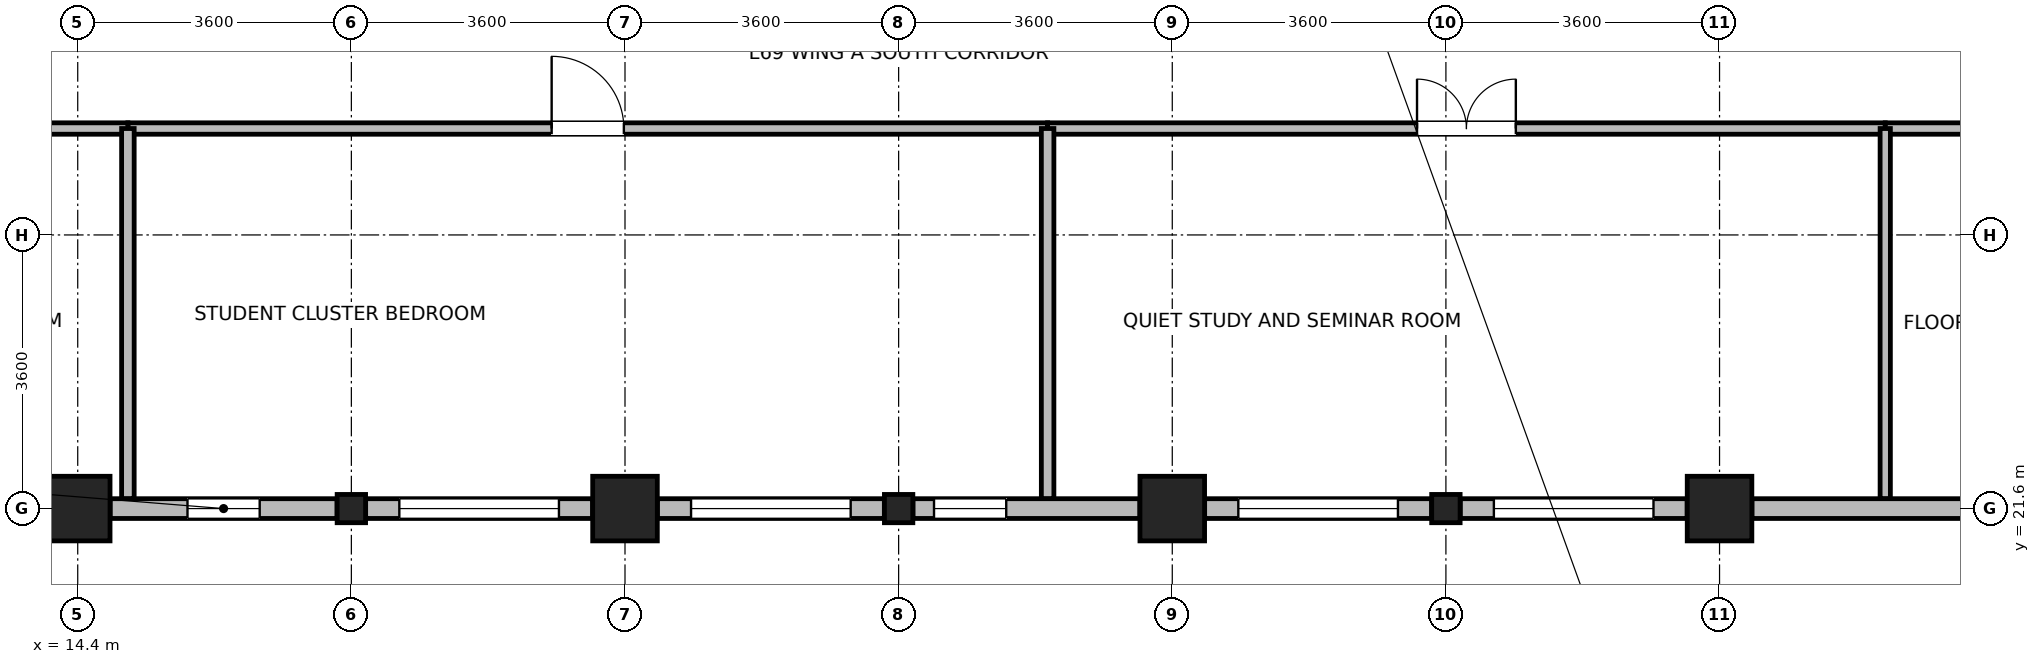
"""IFC4 building model, lengths in metres.
Left out: names, types, materials, properties, quantities, classifications, styles, units other than length and angle.
Written with IfcOpenShell. Run it as: python <this file> out.ifc"""

import sys

from ifc_helpers import new_model, si_unit, direction, frame, frame_2d, origin, origin_2d, place, context, subcontext, project, spatial, rectangle, i_section, extrude, source, transform, mapped, element, fill, save


model = new_model("IFC4")
c1 = context("Model", 3, precision=1e-05, world=origin(), true_north=direction((0.0, 1.0)))
c2 = subcontext(c1, "Body", "Model", "MODEL_VIEW")
j1 = project(units=[si_unit("LENGTHUNIT", "METRE"), si_unit("PLANEANGLEUNIT", "RADIAN")], contexts=[c1])
p1 = place(None, origin())
s1 = spatial("IfcSite", under=j1, at=p1, CompositionType="ELEMENT")
p2 = place(p1, origin())
s2 = spatial("IfcBuilding", under=s1, at=p2, CompositionType="ELEMENT")
p3 = place(p2, frame((0.0, 0.0, 268.4)))
s3 = spatial("IfcBuildingStorey", under=s2, at=p3, CompositionType="ELEMENT", Elevation=268.4)
m1 = source(origin(), c2, "Body", "SweptSolid", [
    extrude(rectangle(XDim=0.85, YDim=0.85, at=origin_2d()), origin(), (0.0, 0.0, 1.0), 3.7),
])
for number, where, z_axis, x_axis in (
    (1, (14.4, 21.6, 0.0), (0.0, 0.0, 1.0), (1.0, 0.0, 0.0)),
    (2, (21.6, 21.6, 0.0), (0.0, 0.0, 1.0), (1.0, 0.0, 0.0)),
    (3, (28.8, 21.6, 0.0), (0.0, 0.0, 1.0), (1.0, 0.0, 0.0)),
    (4, (36.0, 21.6, 0.0), (0.0, 0.0, 1.0), (1.0, 0.0, 0.0)),
):
    element("IfcColumn", number, at=place(p3, frame(where, z_axis=z_axis, x_axis=x_axis)), inside=s3, PredefinedType="COLUMN", context=c2, shape_type="MappedRepresentation", body=[
        mapped(m1, transform((0.0, 0.0, 0.0), x_axis=(1.0, 0.0, 0.0), y_axis=(0.0, 1.0, 0.0), z_axis=(0.0, 0.0, 1.0), scale=1.0)),
    ])
m2 = source(origin(), c2, "Body", "SweptSolid", [
    extrude(i_section(OverallWidth=0.374, OverallDepth=0.372, WebThickness=0.015, FlangeThickness=0.026, FilletRadius=0.015, at=origin_2d()), origin(), (0.0, 0.0, 1.0), 3.7),
])
for number, where, z_axis, x_axis in (
    (5, (18.0, 21.6, 0.0), (0.0, 0.0, 1.0), (1.0, 0.0, 0.0)),
    (6, (25.2, 21.6, 0.0), (0.0, 0.0, 1.0), (1.0, 0.0, 0.0)),
    (7, (32.4, 21.6, 0.0), (0.0, 0.0, 1.0), (1.0, 0.0, 0.0)),
):
    element("IfcColumn", number, at=place(p3, frame(where, z_axis=z_axis, x_axis=x_axis)), inside=s3, PredefinedType="COLUMN", context=c2, shape_type="MappedRepresentation", body=[
        mapped(m2, transform((0.0, 0.0, 0.0), x_axis=(1.0, 0.0, 0.0), y_axis=(0.0, 1.0, 0.0), z_axis=(0.0, 0.0, 1.0), scale=1.0)),
    ])
p4 = place(p3, frame((17.812, 21.6, 0.0), z_axis=(0.0, 0.0, 1.0), x_axis=(-1.0, 0.0, 0.0)))
e8 = element("IfcWall", 8, at=p4, inside=s3, PredefinedType="STANDARD", context=c2, shape_type="SweptSolid", body=[
    extrude(rectangle(XDim=2.986, YDim=0.26, at=frame_2d((1.493, 0.0))), origin(), (0.0, 0.0, 1.0), 3.055),
])
p5 = place(p4, frame((1.018, 0.0, 0.85)))
e9 = element("IfcOpeningElement", 9, at=p5, cuts=e8, PredefinedType="OPENING", context=c2, shape_type="SweptSolid", body=[
    extrude(rectangle(XDim=0.95, YDim=1.75, at=frame_2d((0.475, 0.875))), frame((0.0, 0.14, 0.0), z_axis=(0.0, -1.0, 0.0), x_axis=(1.0, 0.0, 0.0)), (0.0, 0.0, 1.0), 0.28),
])
p6 = place(p3, frame((21.174, 21.6, 0.0), z_axis=(0.0, 0.0, 1.0), x_axis=(-1.0, 0.0, 0.0)))
e10 = element("IfcWall", 10, at=p6, inside=s3, PredefinedType="STANDARD", context=c2, shape_type="SweptSolid", body=[
    extrude(rectangle(XDim=2.986, YDim=0.26, at=frame_2d((1.493, 0.0))), origin(), (0.0, 0.0, 1.0), 3.055),
])
p7 = place(p6, frame((0.443, 0.0, 0.85)))
e11 = element("IfcOpeningElement", 11, at=p7, cuts=e10, PredefinedType="OPENING", context=c2, shape_type="SweptSolid", body=[
    extrude(rectangle(XDim=2.1, YDim=1.95, at=frame_2d((1.05, 0.975))), frame((0.0, 0.14, 0.0), z_axis=(0.0, -1.0, 0.0), x_axis=(1.0, 0.0, 0.0)), (0.0, 0.0, 1.0), 0.28),
])
p8 = place(p3, frame((25.012, 21.6, 0.0), z_axis=(0.0, 0.0, 1.0), x_axis=(-1.0, 0.0, 0.0)))
e12 = element("IfcWall", 12, at=p8, inside=s3, PredefinedType="STANDARD", context=c2, shape_type="SweptSolid", body=[
    extrude(rectangle(XDim=2.986, YDim=0.26, at=frame_2d((1.493, 0.0))), origin(), (0.0, 0.0, 1.0), 3.055),
])
p9 = place(p8, frame((0.443, 0.0, 0.85)))
e13 = element("IfcOpeningElement", 13, at=p9, cuts=e12, PredefinedType="OPENING", context=c2, shape_type="SweptSolid", body=[
    extrude(rectangle(XDim=2.1, YDim=1.95, at=frame_2d((1.05, 0.975))), frame((0.0, 0.14, 0.0), z_axis=(0.0, -1.0, 0.0), x_axis=(1.0, 0.0, 0.0)), (0.0, 0.0, 1.0), 0.28),
])
p10 = place(p3, frame((28.374, 21.6, 0.0), z_axis=(0.0, 0.0, 1.0), x_axis=(-1.0, 0.0, 0.0)))
e14 = element("IfcWall", 14, at=p10, inside=s3, PredefinedType="STANDARD", context=c2, shape_type="SweptSolid", body=[
    extrude(rectangle(XDim=2.986, YDim=0.26, at=frame_2d((1.493, 0.0))), origin(), (0.0, 0.0, 1.0), 3.055),
])
p11 = place(p10, frame((1.759, 0.0, 0.85)))
e15 = element("IfcOpeningElement", 15, at=p11, cuts=e14, PredefinedType="OPENING", context=c2, shape_type="SweptSolid", body=[
    extrude(rectangle(XDim=0.95, YDim=1.75, at=frame_2d((0.475, 0.875))), frame((0.0, 0.14, 0.0), z_axis=(0.0, -1.0, 0.0), x_axis=(1.0, 0.0, 0.0)), (0.0, 0.0, 1.0), 0.28),
])
p12 = place(p3, frame((32.212, 21.6, 0.0), z_axis=(0.0, 0.0, 1.0), x_axis=(-1.0, 0.0, 0.0)))
e16 = element("IfcWall", 16, at=p12, inside=s3, PredefinedType="STANDARD", context=c2, shape_type="SweptSolid", body=[
    extrude(rectangle(XDim=2.986, YDim=0.26, at=frame_2d((1.493, 0.0))), origin(), (0.0, 0.0, 1.0), 3.055),
])
p13 = place(p12, frame((0.443, 0.0, 0.85)))
e17 = element("IfcOpeningElement", 17, at=p13, cuts=e16, PredefinedType="OPENING", context=c2, shape_type="SweptSolid", body=[
    extrude(rectangle(XDim=2.1, YDim=1.95, at=frame_2d((1.05, 0.975))), frame((0.0, 0.14, 0.0), z_axis=(0.0, -1.0, 0.0), x_axis=(1.0, 0.0, 0.0)), (0.0, 0.0, 1.0), 0.28),
])
p14 = place(p3, frame((35.574, 21.6, 0.0), z_axis=(0.0, 0.0, 1.0), x_axis=(-1.0, 0.0, 0.0)))
e18 = element("IfcWall", 18, at=p14, inside=s3, PredefinedType="STANDARD", context=c2, shape_type="SweptSolid", body=[
    extrude(rectangle(XDim=2.986, YDim=0.26, at=frame_2d((1.493, 0.0))), origin(), (0.0, 0.0, 1.0), 3.055),
])
p15 = place(p14, frame((0.443, 0.0, 0.85)))
e19 = element("IfcOpeningElement", 19, at=p15, cuts=e18, PredefinedType="OPENING", context=c2, shape_type="SweptSolid", body=[
    extrude(rectangle(XDim=2.1, YDim=1.95, at=frame_2d((1.05, 0.975))), frame((0.0, 0.14, 0.0), z_axis=(0.0, -1.0, 0.0), x_axis=(1.0, 0.0, 0.0)), (0.0, 0.0, 1.0), 0.28),
])
p16 = place(p3, frame((46.374, 21.6, 0.0), z_axis=(0.0, 0.0, 1.0), x_axis=(-1.0, 0.0, 0.0)))
e20 = element("IfcWall", 20, at=p16, inside=s3, PredefinedType="STANDARD", context=c2, shape_type="SweptSolid", body=[
    extrude(rectangle(XDim=9.948, YDim=0.26, at=frame_2d((4.974, 0.0))), origin(), (0.0, 0.0, 1.0), 3.055),
])
p17 = place(p16, frame((0.608, 0.0, 0.85)))
e21 = element("IfcOpeningElement", 21, at=p17, cuts=e20, PredefinedType="OPENING", context=c2, shape_type="SweptSolid", body=[
    extrude(rectangle(XDim=2.1, YDim=1.95, at=frame_2d((1.05, 0.975))), frame((0.0, 0.14, 0.0), z_axis=(0.0, -1.0, 0.0), x_axis=(1.0, 0.0, 0.0)), (0.0, 0.0, 1.0), 0.28),
])
p18 = place(p16, frame((3.924, 0.0, 0.85)))
e22 = element("IfcOpeningElement", 22, at=p18, cuts=e20, PredefinedType="OPENING", context=c2, shape_type="SweptSolid", body=[
    extrude(rectangle(XDim=2.1, YDim=1.95, at=frame_2d((1.05, 0.975))), frame((0.0, 0.14, 0.0), z_axis=(0.0, -1.0, 0.0), x_axis=(1.0, 0.0, 0.0)), (0.0, 0.0, 1.0), 0.28),
])
p19 = place(p3, frame((15.06, 26.6, 0.0), z_axis=(0.0, 0.0, 1.0), x_axis=(1.0, 0.0, 0.0)))
e23 = element("IfcWall", 23, at=p19, inside=s3, PredefinedType="PARTITIONING", context=c2, shape_type="SweptSolid", body=[
    extrude(rectangle(XDim=12.1, YDim=0.15, at=frame_2d((6.05, 0.0))), origin(), (0.0, 0.0, 1.0), 3.455),
])
p20 = place(p19, frame((5.575, 0.0, 0.0)))
e24 = element("IfcOpeningElement", 24, at=p20, cuts=e23, PredefinedType="OPENING", context=c2, shape_type="SweptSolid", body=[
    extrude(rectangle(XDim=0.95, YDim=2.1, at=frame_2d((0.475, 1.05))), frame((0.0, 0.085, 0.0), z_axis=(0.0, -1.0, 0.0), x_axis=(1.0, 0.0, 0.0)), (0.0, 0.0, 1.0), 0.17),
])
p21 = place(p3, frame((3.732, 26.6, 0.0), z_axis=(0.0, 0.0, 1.0), x_axis=(1.0, 0.0, 0.0)))
e25 = element("IfcWall", 25, at=p21, inside=s3, PredefinedType="PARTITIONING", context=c2, shape_type="SweptSolid", body=[
    extrude(rectangle(XDim=11.328, YDim=0.15, at=frame_2d((5.664, 0.0))), origin(), (0.0, 0.0, 1.0), 3.455),
])
p22 = place(p21, frame((5.189, 0.0, 0.0)))
e26 = element("IfcOpeningElement", 26, at=p22, cuts=e25, PredefinedType="OPENING", context=c2, shape_type="SweptSolid", body=[
    extrude(rectangle(XDim=0.95, YDim=2.1, at=frame_2d((0.475, 1.05))), frame((0.0, 0.085, 0.0), z_axis=(0.0, -1.0, 0.0), x_axis=(1.0, 0.0, 0.0)), (0.0, 0.0, 1.0), 0.17),
])
p23 = place(p3, frame((27.16, 26.6, 0.0), z_axis=(0.0, 0.0, 1.0), x_axis=(1.0, 0.0, 0.0)))
e27 = element("IfcWall", 27, at=p23, inside=s3, PredefinedType="PARTITIONING", context=c2, shape_type="SweptSolid", body=[
    extrude(rectangle(XDim=11.02, YDim=0.15, at=frame_2d((5.51, 0.0))), origin(), (0.0, 0.0, 1.0), 3.455),
])
p24 = place(p23, frame((4.86, 0.0, 0.0)))
e28 = element("IfcOpeningElement", 28, at=p24, cuts=e27, PredefinedType="OPENING", context=c2, shape_type="SweptSolid", body=[
    extrude(rectangle(XDim=1.3, YDim=2.12, at=frame_2d((0.65, 1.06))), frame((0.0, 0.085, 0.0), z_axis=(0.0, -1.0, 0.0), x_axis=(1.0, 0.0, 0.0)), (0.0, 0.0, 1.0), 0.17),
])
p25 = place(p3, frame((38.18, 26.6, 0.0), z_axis=(0.0, 0.0, 1.0), x_axis=(1.0, 0.0, 0.0)))
e29 = element("IfcWall", 29, at=p25, inside=s3, PredefinedType="PARTITIONING", context=c2, shape_type="SweptSolid", body=[
    extrude(rectangle(XDim=8.6, YDim=0.15, at=frame_2d((4.3, 0.0))), origin(), (0.0, 0.0, 1.0), 3.455),
])
p26 = place(p25, frame((3.875, 0.0, 0.0)))
e30 = element("IfcOpeningElement", 30, at=p26, cuts=e29, PredefinedType="OPENING", context=c2, shape_type="SweptSolid", body=[
    extrude(rectangle(XDim=0.85, YDim=2.04, at=frame_2d((0.425, 1.02))), frame((0.0, 0.085, 0.0), z_axis=(0.0, -1.0, 0.0), x_axis=(1.0, 0.0, 0.0)), (0.0, 0.0, 1.0), 0.17),
])
for number, where, z_axis, x_axis in (
    (31, (15.06, 21.732, 0.0), (0.0, 0.0, 1.0), (0.0, 1.0, 0.0)),
    (32, (27.16, 21.732, 0.0), (0.0, 0.0, 1.0), (0.0, 1.0, 0.0)),
):
    element("IfcWall", number, at=place(p3, frame(where, z_axis=z_axis, x_axis=x_axis)), inside=s3, PredefinedType="PARTITIONING", context=c2, shape_type="SweptSolid", body=[
        extrude(rectangle(XDim=4.868, YDim=0.165, at=frame_2d((2.434, 0.0))), origin(), (0.0, 0.0, 1.0), 3.455),
    ])
p27 = place(p3, frame((38.18, 21.732, 0.0), z_axis=(0.0, 0.0, 1.0), x_axis=(0.0, 1.0, 0.0)))
e33 = element("IfcWall", 33, at=p27, inside=s3, PredefinedType="PARTITIONING", context=c2, shape_type="SweptSolid", body=[
    extrude(rectangle(XDim=4.868, YDim=0.135, at=frame_2d((2.434, 0.0))), origin(), (0.0, 0.0, 1.0), 3.455),
])
p28 = place(p5, origin())
e34 = element("IfcWindow", 34, at=p28, inside=s3, PartitioningType="SINGLE_PANEL", PredefinedType="WINDOW", context=c2, shape_type="SweptSolid", body=[
    extrude(rectangle(XDim=0.95, YDim=1.75, at=frame_2d((0.475, 0.875))), frame((0.0, 0.03, 0.0), z_axis=(0.0, -1.0, 0.0), x_axis=(1.0, 0.0, 0.0)), (0.0, 0.0, 1.0), 0.06),
])
fill(e9, e34)
p29 = place(p7, origin())
e35 = element("IfcWindow", 35, at=p29, inside=s3, PartitioningType="SINGLE_PANEL", PredefinedType="WINDOW", context=c2, shape_type="SweptSolid", body=[
    extrude(rectangle(XDim=2.1, YDim=1.95, at=frame_2d((1.05, 0.975))), frame((0.0, 0.03, 0.0), z_axis=(0.0, -1.0, 0.0), x_axis=(1.0, 0.0, 0.0)), (0.0, 0.0, 1.0), 0.06),
])
fill(e11, e35)
p30 = place(p9, origin())
e36 = element("IfcWindow", 36, at=p30, inside=s3, PartitioningType="SINGLE_PANEL", PredefinedType="WINDOW", context=c2, shape_type="SweptSolid", body=[
    extrude(rectangle(XDim=2.1, YDim=1.95, at=frame_2d((1.05, 0.975))), frame((0.0, 0.03, 0.0), z_axis=(0.0, -1.0, 0.0), x_axis=(1.0, 0.0, 0.0)), (0.0, 0.0, 1.0), 0.06),
])
fill(e13, e36)
p31 = place(p11, origin())
e37 = element("IfcWindow", 37, at=p31, inside=s3, PartitioningType="SINGLE_PANEL", PredefinedType="WINDOW", context=c2, shape_type="SweptSolid", body=[
    extrude(rectangle(XDim=0.95, YDim=1.75, at=frame_2d((0.475, 0.875))), frame((0.0, 0.03, 0.0), z_axis=(0.0, -1.0, 0.0), x_axis=(1.0, 0.0, 0.0)), (0.0, 0.0, 1.0), 0.06),
])
fill(e15, e37)
p32 = place(p13, origin())
e38 = element("IfcWindow", 38, at=p32, inside=s3, PartitioningType="SINGLE_PANEL", PredefinedType="WINDOW", context=c2, shape_type="SweptSolid", body=[
    extrude(rectangle(XDim=2.1, YDim=1.95, at=frame_2d((1.05, 0.975))), frame((0.0, 0.03, 0.0), z_axis=(0.0, -1.0, 0.0), x_axis=(1.0, 0.0, 0.0)), (0.0, 0.0, 1.0), 0.06),
])
fill(e17, e38)
p33 = place(p15, origin())
e39 = element("IfcWindow", 39, at=p33, inside=s3, PartitioningType="SINGLE_PANEL", PredefinedType="WINDOW", context=c2, shape_type="SweptSolid", body=[
    extrude(rectangle(XDim=2.1, YDim=1.95, at=frame_2d((1.05, 0.975))), frame((0.0, 0.03, 0.0), z_axis=(0.0, -1.0, 0.0), x_axis=(1.0, 0.0, 0.0)), (0.0, 0.0, 1.0), 0.06),
])
fill(e19, e39)
p34 = place(p20, origin())
e40 = element("IfcDoor", 40, at=p34, inside=s3, OperationType="SINGLE_SWING_LEFT", PredefinedType="DOOR", context=c2, shape_type="SweptSolid", body=[
    extrude(rectangle(XDim=0.95, YDim=2.1, at=frame_2d((0.475, 1.05))), frame((0.0, 0.025, 0.0), z_axis=(0.0, -1.0, 0.0), x_axis=(1.0, 0.0, 0.0)), (0.0, 0.0, 1.0), 0.05),
])
fill(e24, e40)
p35 = place(p24, origin())
e41 = element("IfcDoor", 41, at=p35, inside=s3, OperationType="DOUBLE_DOOR_SINGLE_SWING", PredefinedType="DOOR", context=c2, shape_type="SweptSolid", body=[
    extrude(rectangle(XDim=1.3, YDim=2.12, at=frame_2d((0.65, 1.06))), frame((0.0, 0.025, 0.0), z_axis=(0.0, -1.0, 0.0), x_axis=(1.0, 0.0, 0.0)), (0.0, 0.0, 1.0), 0.05),
])
fill(e28, e41)
save(model, sys.argv[1])
